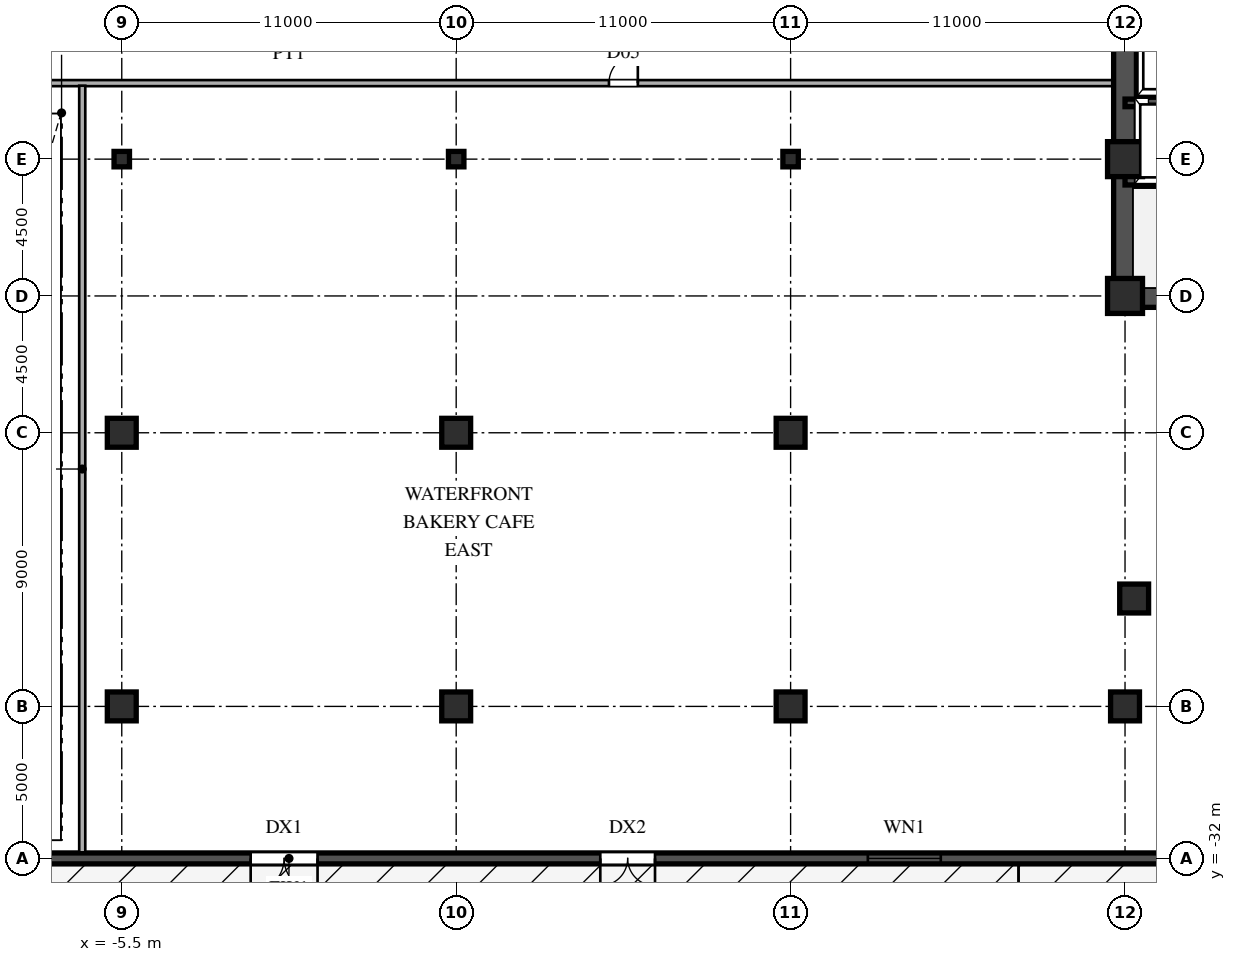
"""IFC4 building model, lengths in metres.
Left out: names, types, materials, properties, quantities, classifications, styles, units other than length and angle.
Written with IfcOpenShell. Run it as: python <this file> out.ifc"""

import sys

from ifc_helpers import new_model, si_unit, direction, frame, frame_2d, origin, origin_2d, place, context, subcontext, project, spatial, rectangle, hollow_rectangle, hollow_circle, extrude, source, transform, mapped, element, fill, save


model = new_model("IFC4")
c1 = context("Model", 3, precision=1e-05, world=origin(), true_north=direction((0.0, 1.0)))
c2 = subcontext(c1, "Body", "Model", "MODEL_VIEW")
j1 = project(units=[si_unit("LENGTHUNIT", "METRE"), si_unit("PLANEANGLEUNIT", "RADIAN")], contexts=[c1])
p1 = place(None, origin())
s1 = spatial("IfcSite", under=j1, at=p1, CompositionType="ELEMENT")
p2 = place(p1, origin())
s2 = spatial("IfcBuilding", under=s1, at=p2, CompositionType="ELEMENT")
p3 = place(p2, origin())
s3 = spatial("IfcBuildingStorey", under=s2, at=p3, CompositionType="ELEMENT", Elevation=0.0)
m1 = source(origin(), c2, "Body", "SweptSolid", [
    extrude(hollow_rectangle(XDim=1.15, YDim=1.15, WallThickness=0.048, at=origin_2d()), origin(), (0.0, 0.0, 1.0), 5.4),
])
for number, where, z_axis, x_axis in (
    (1, (27.5, -13.5, 0.0), (0.0, 0.0, 1.0), (1.0, 0.0, 0.0)),
    (2, (27.5, -9.0, 0.0), (0.0, 0.0, 1.0), (1.0, 0.0, 0.0)),
):
    element("IfcColumn", number, at=place(p3, frame(where, z_axis=z_axis, x_axis=x_axis)), inside=s3, PredefinedType="COLUMN", context=c2, shape_type="MappedRepresentation", body=[
        mapped(m1, transform((0.0, 0.0, 0.0), scale=1.0)),
    ])
m2 = source(origin(), c2, "Body", "SweptSolid", [
    extrude(rectangle(XDim=0.95, YDim=0.95, at=origin_2d()), origin(), (0.0, 0.0, 1.0), 5.4),
])
for number, where, z_axis, x_axis in (
    (3, (27.5, -27.0, 0.0), (0.0, 0.0, 1.0), (1.0, 0.0, 0.0)),
    (4, (27.8, -23.451, 0.0), (0.0, 0.0, 1.0), (1.0, 0.0, 0.0)),
    (5, (-5.5, -27.0, 0.0), (0.0, 0.0, 1.0), (1.0, 0.0, 0.0)),
    (6, (-5.5, -18.0, 0.0), (0.0, 0.0, 1.0), (1.0, 0.0, 0.0)),
):
    element("IfcColumn", number, at=place(p3, frame(where, z_axis=z_axis, x_axis=x_axis)), inside=s3, PredefinedType="COLUMN", context=c2, shape_type="MappedRepresentation", body=[
        mapped(m2, transform((0.0, 0.0, 0.0), scale=1.0)),
    ])
m3 = source(origin(), c2, "Body", "SweptSolid", [
    extrude(hollow_circle(Radius=0.254, WallThickness=0.019, at=origin_2d()), origin(), (0.0, 0.0, 1.0), 5.4),
])
p4 = place(p3, frame((-5.5, -9.0, 0.0), z_axis=(0.0, 0.0, 1.0), x_axis=(1.0, 0.0, 0.0)))
e7 = element("IfcColumn", 7, at=p4, inside=s3, PredefinedType="COLUMN", context=c2, shape_type="MappedRepresentation", body=[
    mapped(m3, transform((0.0, 0.0, 0.0), scale=1.0)),
])
for number, where, z_axis, x_axis in (
    (8, (5.5, -27.0, 0.0), (0.0, 0.0, 1.0), (1.0, 0.0, 0.0)),
    (9, (5.5, -18.0, 0.0), (0.0, 0.0, 1.0), (1.0, 0.0, 0.0)),
):
    element("IfcColumn", number, at=place(p3, frame(where, z_axis=z_axis, x_axis=x_axis)), inside=s3, PredefinedType="COLUMN", context=c2, shape_type="MappedRepresentation", body=[
        mapped(m2, transform((0.0, 0.0, 0.0), scale=1.0)),
    ])
p5 = place(p3, frame((5.5, -9.0, 0.0), z_axis=(0.0, 0.0, 1.0), x_axis=(1.0, 0.0, 0.0)))
e10 = element("IfcColumn", 10, at=p5, inside=s3, PredefinedType="COLUMN", context=c2, shape_type="MappedRepresentation", body=[
    mapped(m3, transform((0.0, 0.0, 0.0), scale=1.0)),
])
for number, where, z_axis, x_axis in (
    (11, (16.5, -27.0, 0.0), (0.0, 0.0, 1.0), (1.0, 0.0, 0.0)),
    (12, (16.5, -18.0, 0.0), (0.0, 0.0, 1.0), (1.0, 0.0, 0.0)),
):
    element("IfcColumn", number, at=place(p3, frame(where, z_axis=z_axis, x_axis=x_axis)), inside=s3, PredefinedType="COLUMN", context=c2, shape_type="MappedRepresentation", body=[
        mapped(m2, transform((0.0, 0.0, 0.0), scale=1.0)),
    ])
p6 = place(p3, frame((16.5, -9.0, 0.0), z_axis=(0.0, 0.0, 1.0), x_axis=(1.0, 0.0, 0.0)))
e13 = element("IfcColumn", 13, at=p6, inside=s3, PredefinedType="COLUMN", context=c2, shape_type="MappedRepresentation", body=[
    mapped(m3, transform((0.0, 0.0, 0.0), scale=1.0)),
])
p7 = place(p3, frame((-71.96, -32.0, 0.0), z_axis=(0.0, 0.0, 1.0), x_axis=(1.0, 0.0, 0.0)))
e14 = element("IfcWall", 14, at=p7, inside=s3, PredefinedType="SOLIDWALL", context=c2, shape_type="SweptSolid", body=[
    extrude(rectangle(XDim=143.92, YDim=0.36, at=frame_2d((71.96, 0.0))), origin(), (0.0, 0.0, 1.0), 5.12),
])
p8 = place(p7, frame((18.0, 0.0, 0.0)))
e15 = element("IfcOpeningElement", 15, at=p8, cuts=e14, PredefinedType="OPENING", context=c2, shape_type="SweptSolid", body=[
    extrude(rectangle(XDim=2.2, YDim=2.4, at=frame_2d((1.1, 1.2))), frame((0.0, 0.19, 0.0), z_axis=(0.0, -1.0, 0.0), x_axis=(1.0, 0.0, 0.0)), (0.0, 0.0, 1.0), 0.38),
])
p9 = place(p7, frame((48.0, 0.0, 0.0)))
e16 = element("IfcOpeningElement", 16, at=p9, cuts=e14, PredefinedType="OPENING", context=c2, shape_type="SweptSolid", body=[
    extrude(rectangle(XDim=1.8, YDim=2.4, at=frame_2d((0.9, 1.2))), frame((0.0, 0.19, 0.0), z_axis=(0.0, -1.0, 0.0), x_axis=(1.0, 0.0, 0.0)), (0.0, 0.0, 1.0), 0.38),
])
p10 = place(p7, frame((57.8, 0.0, 0.0)))
e17 = element("IfcOpeningElement", 17, at=p10, cuts=e14, PredefinedType="OPENING", context=c2, shape_type="SweptSolid", body=[
    extrude(rectangle(XDim=6.2, YDim=3.1, at=frame_2d((3.1, 1.55))), frame((0.0, 0.19, 0.0), z_axis=(0.0, -1.0, 0.0), x_axis=(1.0, 0.0, 0.0)), (0.0, 0.0, 1.0), 0.38),
])
p11 = place(p7, frame((70.7, 0.0, 0.0)))
e18 = element("IfcOpeningElement", 18, at=p11, cuts=e14, PredefinedType="OPENING", context=c2, shape_type="SweptSolid", body=[
    extrude(rectangle(XDim=2.2, YDim=2.4, at=frame_2d((1.1, 1.2))), frame((0.0, 0.19, 0.0), z_axis=(0.0, -1.0, 0.0), x_axis=(1.0, 0.0, 0.0)), (0.0, 0.0, 1.0), 0.38),
])
p12 = place(p7, frame((82.2, 0.0, 0.0)))
e19 = element("IfcOpeningElement", 19, at=p12, cuts=e14, PredefinedType="OPENING", context=c2, shape_type="SweptSolid", body=[
    extrude(rectangle(XDim=1.8, YDim=2.4, at=frame_2d((0.9, 1.2))), frame((0.0, 0.19, 0.0), z_axis=(0.0, -1.0, 0.0), x_axis=(1.0, 0.0, 0.0)), (0.0, 0.0, 1.0), 0.38),
])
p13 = place(p7, frame((120.2, 0.0, 0.0)))
e20 = element("IfcOpeningElement", 20, at=p13, cuts=e14, PredefinedType="OPENING", context=c2, shape_type="SweptSolid", body=[
    extrude(rectangle(XDim=2.2, YDim=2.4, at=frame_2d((1.1, 1.2))), frame((0.0, 0.19, 0.0), z_axis=(0.0, -1.0, 0.0), x_axis=(1.0, 0.0, 0.0)), (0.0, 0.0, 1.0), 0.38),
])
p14 = place(p7, frame((36.51, 0.0, 0.0)))
e21 = element("IfcOpeningElement", 21, at=p14, cuts=e14, PredefinedType="OPENING", context=c2, shape_type="SweptSolid", body=[
    extrude(rectangle(XDim=2.2, YDim=2.4, at=frame_2d((1.1, 1.2))), frame((0.0, 0.19, 0.0), z_axis=(0.0, -1.0, 0.0), x_axis=(1.0, 0.0, 0.0)), (0.0, 0.0, 1.0), 0.38),
])
p15 = place(p7, frame((105.21, 0.0, 0.0)))
e22 = element("IfcOpeningElement", 22, at=p15, cuts=e14, PredefinedType="OPENING", context=c2, shape_type="SweptSolid", body=[
    extrude(rectangle(XDim=2.2, YDim=2.4, at=frame_2d((1.1, 1.2))), frame((0.0, 0.19, 0.0), z_axis=(0.0, -1.0, 0.0), x_axis=(1.0, 0.0, 0.0)), (0.0, 0.0, 1.0), 0.38),
])
p16 = place(p7, frame((6.0, 0.0, 0.9)))
e23 = element("IfcOpeningElement", 23, at=p16, cuts=e14, PredefinedType="OPENING", context=c2, shape_type="SweptSolid", body=[
    extrude(rectangle(XDim=2.4, YDim=2.2, at=frame_2d((1.2, 1.1))), frame((0.0, 0.19, 0.0), z_axis=(0.0, -1.0, 0.0), x_axis=(1.0, 0.0, 0.0)), (0.0, 0.0, 1.0), 0.38),
])
p17 = place(p7, frame((12.0, 0.0, 0.9)))
e24 = element("IfcOpeningElement", 24, at=p17, cuts=e14, PredefinedType="OPENING", context=c2, shape_type="SweptSolid", body=[
    extrude(rectangle(XDim=2.4, YDim=2.2, at=frame_2d((1.2, 1.1))), frame((0.0, 0.19, 0.0), z_axis=(0.0, -1.0, 0.0), x_axis=(1.0, 0.0, 0.0)), (0.0, 0.0, 1.0), 0.38),
])
p18 = place(p7, frame((28.0, 0.0, 0.9)))
e25 = element("IfcOpeningElement", 25, at=p18, cuts=e14, PredefinedType="OPENING", context=c2, shape_type="SweptSolid", body=[
    extrude(rectangle(XDim=2.4, YDim=2.2, at=frame_2d((1.2, 1.1))), frame((0.0, 0.19, 0.0), z_axis=(0.0, -1.0, 0.0), x_axis=(1.0, 0.0, 0.0)), (0.0, 0.0, 1.0), 0.38),
])
p19 = place(p7, frame((91.0, 0.0, 0.9)))
e26 = element("IfcOpeningElement", 26, at=p19, cuts=e14, PredefinedType="OPENING", context=c2, shape_type="SweptSolid", body=[
    extrude(rectangle(XDim=2.4, YDim=2.2, at=frame_2d((1.2, 1.1))), frame((0.0, 0.19, 0.0), z_axis=(0.0, -1.0, 0.0), x_axis=(1.0, 0.0, 0.0)), (0.0, 0.0, 1.0), 0.38),
])
p20 = place(p7, frame((102.0, 0.0, 0.9)))
e27 = element("IfcOpeningElement", 27, at=p20, cuts=e14, PredefinedType="OPENING", context=c2, shape_type="SweptSolid", body=[
    extrude(rectangle(XDim=2.4, YDim=2.2, at=frame_2d((1.2, 1.1))), frame((0.0, 0.19, 0.0), z_axis=(0.0, -1.0, 0.0), x_axis=(1.0, 0.0, 0.0)), (0.0, 0.0, 1.0), 0.38),
])
p21 = place(p7, frame((110.0, 0.0, 0.9)))
e28 = element("IfcOpeningElement", 28, at=p21, cuts=e14, PredefinedType="OPENING", context=c2, shape_type="SweptSolid", body=[
    extrude(rectangle(XDim=2.4, YDim=2.2, at=frame_2d((1.2, 1.1))), frame((0.0, 0.19, 0.0), z_axis=(0.0, -1.0, 0.0), x_axis=(1.0, 0.0, 0.0)), (0.0, 0.0, 1.0), 0.38),
])
p22 = place(p7, frame((130.0, 0.0, 0.9)))
e29 = element("IfcOpeningElement", 29, at=p22, cuts=e14, PredefinedType="OPENING", context=c2, shape_type="SweptSolid", body=[
    extrude(rectangle(XDim=2.4, YDim=2.2, at=frame_2d((1.2, 1.1))), frame((0.0, 0.19, 0.0), z_axis=(0.0, -1.0, 0.0), x_axis=(1.0, 0.0, 0.0)), (0.0, 0.0, 1.0), 0.38),
])
p23 = place(p3, frame((27.5, -13.5, 0.0), z_axis=(0.0, 0.0, 1.0), x_axis=(0.0, 1.0, 0.0)))
e30 = element("IfcWall", 30, at=p23, inside=s3, PredefinedType="SHEAR", context=c2, shape_type="SweptSolid", body=[
    extrude(rectangle(XDim=12.2, YDim=0.75, at=frame_2d((6.1, 0.0))), origin(), (0.0, 0.0, 1.0), 5.12),
])
p24 = place(p3, frame((27.5, -13.5, 0.0), z_axis=(0.0, 0.0, 1.0), x_axis=(1.0, 0.0, 0.0)))
e31 = element("IfcWall", 31, at=p24, inside=s3, PredefinedType="SHEAR", context=c2, shape_type="SweptSolid", body=[
    extrude(rectangle(XDim=9.0, YDim=0.75, at=frame_2d((4.5, 0.0))), origin(), (0.0, 0.0, 1.0), 5.12),
])
p25 = place(p24, frame((7.3, 0.0, 0.0)))
e32 = element("IfcOpeningElement", 32, at=p25, cuts=e31, PredefinedType="OPENING", context=c2, shape_type="SweptSolid", body=[
    extrude(rectangle(XDim=1.1, YDim=2.2, at=frame_2d((0.55, 1.1))), frame((0.0, 0.385, 0.0), z_axis=(0.0, -1.0, 0.0), x_axis=(1.0, 0.0, 0.0)), (0.0, 0.0, 1.0), 0.77),
])
p26 = place(p3, frame((27.5, -9.7, 0.0), z_axis=(0.0, 0.0, 1.0), x_axis=(1.0, 0.0, 0.0)))
e33 = element("IfcWall", 33, at=p26, inside=s3, PredefinedType="SHEAR", context=c2, shape_type="SweptSolid", body=[
    extrude(rectangle(XDim=9.0, YDim=0.3, at=frame_2d((4.5, 0.0))), origin(), (0.0, 0.0, 1.0), 5.12),
])
p27 = place(p26, frame((7.3, 0.0, 0.0)))
e34 = element("IfcOpeningElement", 34, at=p27, cuts=e33, PredefinedType="OPENING", context=c2, shape_type="SweptSolid", body=[
    extrude(rectangle(XDim=1.1, YDim=2.2, at=frame_2d((0.55, 1.1))), frame((0.0, 0.16, 0.0), z_axis=(0.0, -1.0, 0.0), x_axis=(1.0, 0.0, 0.0)), (0.0, 0.0, 1.0), 0.32),
])
p28 = place(p3, frame((27.5, -7.15, 0.0), z_axis=(0.0, 0.0, 1.0), x_axis=(1.0, 0.0, 0.0)))
e35 = element("IfcWall", 35, at=p28, inside=s3, PredefinedType="SHEAR", context=c2, shape_type="SweptSolid", body=[
    extrude(rectangle(XDim=2.8, YDim=0.25, at=frame_2d((1.4, 0.0))), origin(), (0.0, 0.0, 1.0), 5.12),
])
p29 = place(p3, frame((-27.12, -6.5, 0.0), z_axis=(0.0, 0.0, 1.0), x_axis=(1.0, 0.0, 0.0)))
e36 = element("IfcWall", 36, at=p29, inside=s3, PredefinedType="PARTITIONING", context=c2, shape_type="SweptSolid", body=[
    extrude(rectangle(XDim=54.24, YDim=0.2, at=frame_2d((27.12, 0.0))), origin(), (0.0, 0.0, 1.0), 5.12),
])
p30 = place(p29, frame((5.145, 0.0, 0.0)))
e37 = element("IfcOpeningElement", 37, at=p30, cuts=e36, PredefinedType="OPENING", context=c2, shape_type="SweptSolid", body=[
    extrude(rectangle(XDim=0.95, YDim=2.15, at=frame_2d((0.475, 1.075))), frame((0.0, 0.11, 0.0), z_axis=(0.0, -1.0, 0.0), x_axis=(1.0, 0.0, 0.0)), (0.0, 0.0, 1.0), 0.22),
])
p31 = place(p29, frame((37.645, 0.0, 0.0)))
e38 = element("IfcOpeningElement", 38, at=p31, cuts=e36, PredefinedType="OPENING", context=c2, shape_type="SweptSolid", body=[
    extrude(rectangle(XDim=0.95, YDim=2.15, at=frame_2d((0.475, 1.075))), frame((0.0, 0.11, 0.0), z_axis=(0.0, -1.0, 0.0), x_axis=(1.0, 0.0, 0.0)), (0.0, 0.0, 1.0), 0.22),
])
p32 = place(p3, frame((-6.8, -31.8, 0.0), z_axis=(0.0, 0.0, 1.0), x_axis=(0.0, 1.0, 0.0)))
e39 = element("IfcWall", 39, at=p32, inside=s3, PredefinedType="PARTITIONING", context=c2, shape_type="SweptSolid", body=[
    extrude(rectangle(XDim=25.215, YDim=0.2, at=frame_2d((12.607, 0.0))), origin(), (0.0, 0.0, 1.0), 5.12),
])
m4 = source(origin(), c2, "Body", "SweptSolid", [
    extrude(rectangle(XDim=2.2, YDim=2.4, at=frame_2d((1.1, 1.2))), frame((0.0, 0.025, 0.0), z_axis=(0.0, -1.0, 0.0), x_axis=(1.0, 0.0, 0.0)), (0.0, 0.0, 1.0), 0.05),
])
p33 = place(p11, frame((2.2, 0.0, 0.0), z_axis=(0.0, 0.0, 1.0), x_axis=(-1.0, 0.0, 0.0)))
e40 = element("IfcDoor", 40, at=p33, inside=s3, OperationType="DOUBLE_SWING_LEFT", PredefinedType="DOOR", context=c2, shape_type="MappedRepresentation", body=[
    mapped(m4, transform((0.0, 0.0, 0.0), scale=1.0)),
])
fill(e18, e40)
m5 = source(origin(), c2, "Body", "SweptSolid", [
    extrude(rectangle(XDim=1.8, YDim=2.4, at=frame_2d((0.9, 1.2))), frame((0.0, 0.025, 0.0), z_axis=(0.0, -1.0, 0.0), x_axis=(1.0, 0.0, 0.0)), (0.0, 0.0, 1.0), 0.05),
])
p34 = place(p12, frame((1.8, 0.0, 0.0), z_axis=(0.0, 0.0, 1.0), x_axis=(-1.0, 0.0, 0.0)))
e41 = element("IfcDoor", 41, at=p34, inside=s3, OperationType="DOUBLE_SWING_LEFT", PredefinedType="DOOR", context=c2, shape_type="MappedRepresentation", body=[
    mapped(m5, transform((0.0, 0.0, 0.0), scale=1.0)),
])
fill(e19, e41)
m6 = source(origin(), c2, "Body", "SweptSolid", [
    extrude(rectangle(XDim=2.4, YDim=2.2, at=frame_2d((1.2, 1.1))), frame((0.0, 0.03, 0.0), z_axis=(0.0, -1.0, 0.0), x_axis=(1.0, 0.0, 0.0)), (0.0, 0.0, 1.0), 0.06),
])
p35 = place(p19, origin())
e42 = element("IfcWindow", 42, at=p35, inside=s3, PartitioningType="SINGLE_PANEL", PredefinedType="WINDOW", context=c2, shape_type="MappedRepresentation", body=[
    mapped(m6, transform((0.0, 0.0, 0.0), scale=1.0)),
])
fill(e26, e42)
m7 = source(origin(), c2, "Body", "SweptSolid", [
    extrude(rectangle(XDim=0.95, YDim=2.15, at=frame_2d((0.475, 1.075))), frame((0.0, 0.025, 0.0), z_axis=(0.0, -1.0, 0.0), x_axis=(1.0, 0.0, 0.0)), (0.0, 0.0, 1.0), 0.05),
])
p36 = place(p31, origin())
e43 = element("IfcDoor", 43, at=p36, inside=s3, OperationType="SINGLE_SWING_RIGHT", PredefinedType="DOOR", context=c2, shape_type="MappedRepresentation", body=[
    mapped(m7, transform((0.0, 0.0, 0.0), scale=1.0)),
])
fill(e38, e43)
save(model, sys.argv[1])
